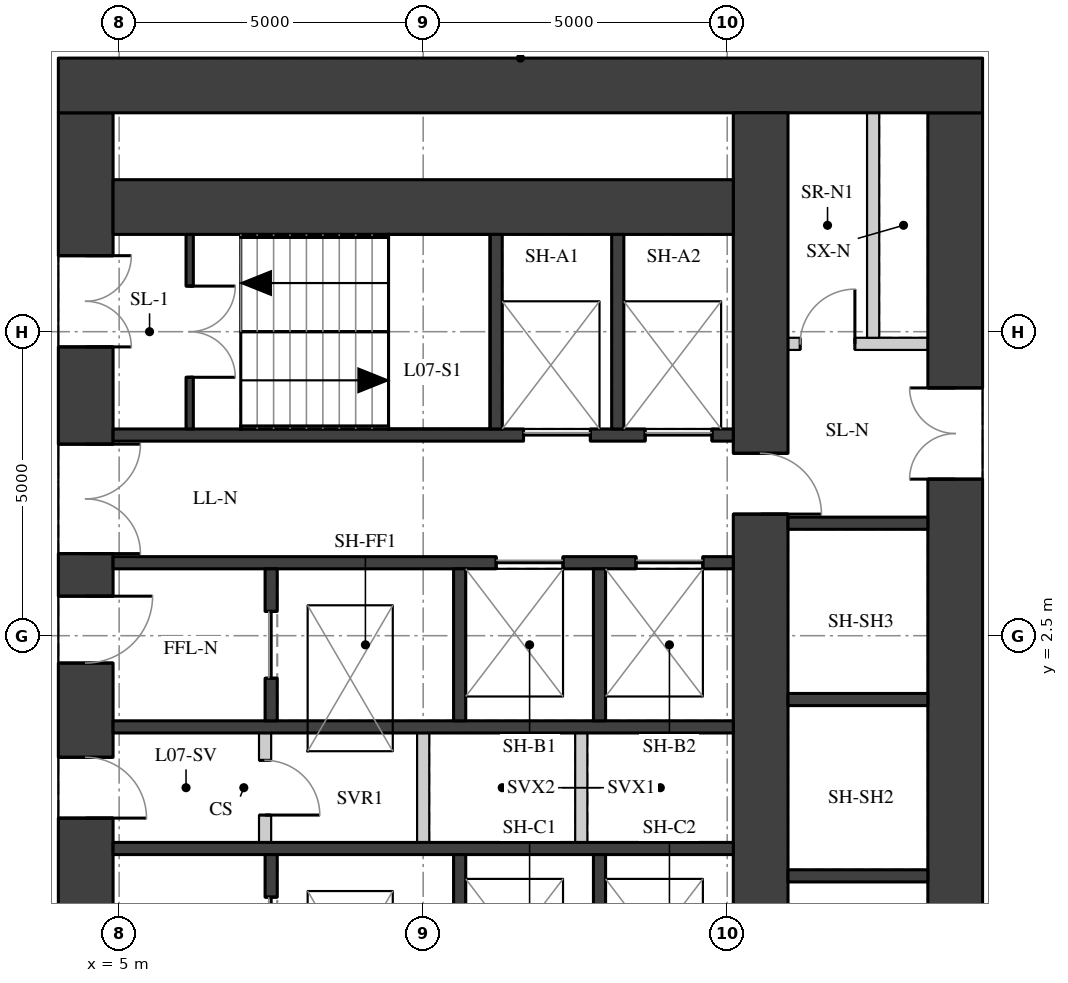
"""IFC4 building model, lengths in metres.
Left out: names, types, materials, properties, quantities, classifications, styles, units other than length and angle.
Written with IfcOpenShell. Run it as: python <this file> out.ifc"""

import sys

from ifc_helpers import new_model, si_unit, direction, frame, frame_2d, origin, place, context, subcontext, project, spatial, rectangle, extrude, element, fill, save


model = new_model("IFC4")
c1 = context("Model", 3, precision=1e-05, world=origin(), true_north=direction((0.0, 1.0)))
c2 = subcontext(c1, "Body", "Model", "MODEL_VIEW")
j1 = project(units=[si_unit("LENGTHUNIT", "METRE"), si_unit("PLANEANGLEUNIT", "RADIAN")], contexts=[c1])
p1 = place(None, origin())
s1 = spatial("IfcSite", under=j1, at=p1, CompositionType="ELEMENT")
p2 = place(p1, origin())
s2 = spatial("IfcBuilding", under=s1, at=p2, CompositionType="ELEMENT")
p3 = place(p2, frame((0.0, 0.0, 31.6)))
s3 = spatial("IfcBuildingStorey", under=s2, at=p3, CompositionType="ELEMENT", Elevation=31.6)
p4 = place(p3, frame((4.45, -11.1, 0.0), z_axis=(0.0, 0.0, 1.0), x_axis=(0.0, 1.0, 0.0)))
e1 = element("IfcWall", 1, at=p4, inside=s3, PredefinedType="SHEAR", context=c2, shape_type="SweptSolid", body=[
    extrude(rectangle(XDim=22.2, YDim=0.9, at=frame_2d((11.1, 0.0))), origin(), (0.0, 0.0, 1.0), 3.02),
])
p5 = place(p4, frame((2.35, 0.0, 0.0)))
e2 = element("IfcOpeningElement", 2, at=p5, cuts=e1, PredefinedType="OPENING", context=c2, shape_type="SweptSolid", body=[
    extrude(rectangle(XDim=1.5, YDim=2.1, at=frame_2d((0.75, 1.05))), frame((0.0, 0.46, 0.0), z_axis=(0.0, -1.0, 0.0), x_axis=(1.0, 0.0, 0.0)), (0.0, 0.0, 1.0), 0.92),
])
p6 = place(p4, frame((5.45, 0.0, 0.0)))
e3 = element("IfcOpeningElement", 3, at=p6, cuts=e1, PredefinedType="OPENING", context=c2, shape_type="SweptSolid", body=[
    extrude(rectangle(XDim=1.8, YDim=2.1, at=frame_2d((0.9, 1.05))), frame((0.0, 0.46, 0.0), z_axis=(0.0, -1.0, 0.0), x_axis=(1.0, 0.0, 0.0)), (0.0, 0.0, 1.0), 0.92),
])
p7 = place(p4, frame((7.95, 0.0, 0.0)))
e4 = element("IfcOpeningElement", 4, at=p7, cuts=e1, PredefinedType="OPENING", context=c2, shape_type="SweptSolid", body=[
    extrude(rectangle(XDim=1.1, YDim=2.1, at=frame_2d((0.55, 1.05))), frame((0.0, 0.46, 0.0), z_axis=(0.0, -1.0, 0.0), x_axis=(1.0, 0.0, 0.0)), (0.0, 0.0, 1.0), 0.92),
])
p8 = place(p4, frame((10.6, 0.0, 0.0)))
e5 = element("IfcOpeningElement", 5, at=p8, cuts=e1, PredefinedType="OPENING", context=c2, shape_type="SweptSolid", body=[
    extrude(rectangle(XDim=1.0, YDim=2.1, at=frame_2d((0.5, 1.05))), frame((0.0, 0.46, 0.0), z_axis=(0.0, -1.0, 0.0), x_axis=(1.0, 0.0, 0.0)), (0.0, 0.0, 1.0), 0.92),
])
p9 = place(p4, frame((13.15, 0.0, 0.0)))
e6 = element("IfcOpeningElement", 6, at=p9, cuts=e1, PredefinedType="OPENING", context=c2, shape_type="SweptSolid", body=[
    extrude(rectangle(XDim=1.1, YDim=2.1, at=frame_2d((0.55, 1.05))), frame((0.0, 0.46, 0.0), z_axis=(0.0, -1.0, 0.0), x_axis=(1.0, 0.0, 0.0)), (0.0, 0.0, 1.0), 0.92),
])
p10 = place(p4, frame((14.95, 0.0, 0.0)))
e7 = element("IfcOpeningElement", 7, at=p10, cuts=e1, PredefinedType="OPENING", context=c2, shape_type="SweptSolid", body=[
    extrude(rectangle(XDim=1.8, YDim=2.1, at=frame_2d((0.9, 1.05))), frame((0.0, 0.46, 0.0), z_axis=(0.0, -1.0, 0.0), x_axis=(1.0, 0.0, 0.0)), (0.0, 0.0, 1.0), 0.92),
])
p11 = place(p4, frame((18.35, 0.0, 0.0)))
e8 = element("IfcOpeningElement", 8, at=p11, cuts=e1, PredefinedType="OPENING", context=c2, shape_type="SweptSolid", body=[
    extrude(rectangle(XDim=1.5, YDim=2.1, at=frame_2d((0.75, 1.05))), frame((0.0, 0.46, 0.0), z_axis=(0.0, -1.0, 0.0), x_axis=(1.0, 0.0, 0.0)), (0.0, 0.0, 1.0), 0.92),
])
p12 = place(p3, frame((18.75, -11.1, 0.0), z_axis=(0.0, 0.0, 1.0), x_axis=(0.0, 1.0, 0.0)))
e9 = element("IfcWall", 9, at=p12, inside=s3, PredefinedType="SHEAR", context=c2, shape_type="SweptSolid", body=[
    extrude(rectangle(XDim=22.2, YDim=0.9, at=frame_2d((11.1, 0.0))), origin(), (0.0, 0.0, 1.0), 3.02),
])
p13 = place(p12, frame((16.175, 0.0, 0.0)))
e10 = element("IfcOpeningElement", 10, at=p13, cuts=e9, PredefinedType="OPENING", context=c2, shape_type="SweptSolid", body=[
    extrude(rectangle(XDim=1.5, YDim=2.1, at=frame_2d((0.75, 1.05))), frame((0.0, 0.46, 0.0), z_axis=(0.0, -1.0, 0.0), x_axis=(1.0, 0.0, 0.0)), (0.0, 0.0, 1.0), 0.92),
])
p14 = place(p12, frame((5.025, 0.0, 0.0)))
e11 = element("IfcOpeningElement", 11, at=p14, cuts=e9, PredefinedType="OPENING", context=c2, shape_type="SweptSolid", body=[
    extrude(rectangle(XDim=1.5, YDim=2.1, at=frame_2d((0.75, 1.05))), frame((0.0, 0.46, 0.0), z_axis=(0.0, -1.0, 0.0), x_axis=(1.0, 0.0, 0.0)), (0.0, 0.0, 1.0), 0.92),
])
p15 = place(p3, frame((4.0, 11.55, 0.0), z_axis=(0.0, 0.0, 1.0), x_axis=(1.0, 0.0, 0.0)))
e12 = element("IfcWall", 12, at=p15, inside=s3, PredefinedType="SHEAR", context=c2, shape_type="SweptSolid", body=[
    extrude(rectangle(XDim=15.2, YDim=0.9, at=frame_2d((7.6, 0.0))), origin(), (0.0, 0.0, 1.0), 3.02),
])
p16 = place(p3, frame((15.55, -11.1, 0.0), z_axis=(0.0, 0.0, 1.0), x_axis=(0.0, 1.0, 0.0)))
e13 = element("IfcWall", 13, at=p16, inside=s3, PredefinedType="SHEAR", context=c2, shape_type="SweptSolid", body=[
    extrude(rectangle(XDim=22.2, YDim=0.9, at=frame_2d((11.1, 0.0))), origin(), (0.0, 0.0, 1.0), 3.02),
])
p17 = place(p16, frame((15.6, 0.0, 0.0)))
e14 = element("IfcOpeningElement", 14, at=p17, cuts=e13, PredefinedType="OPENING", context=c2, shape_type="SweptSolid", body=[
    extrude(rectangle(XDim=1.0, YDim=2.1, at=frame_2d((0.5, 1.05))), frame((0.0, 0.46, 0.0), z_axis=(0.0, -1.0, 0.0), x_axis=(1.0, 0.0, 0.0)), (0.0, 0.0, 1.0), 0.92),
])
p18 = place(p16, frame((5.6, 0.0, 0.0)))
e15 = element("IfcOpeningElement", 15, at=p18, cuts=e13, PredefinedType="OPENING", context=c2, shape_type="SweptSolid", body=[
    extrude(rectangle(XDim=1.0, YDim=2.1, at=frame_2d((0.5, 1.05))), frame((0.0, 0.46, 0.0), z_axis=(0.0, -1.0, 0.0), x_axis=(1.0, 0.0, 0.0)), (0.0, 0.0, 1.0), 0.92),
])
p19 = place(p3, frame((4.9, 9.55, 0.0), z_axis=(0.0, 0.0, 1.0), x_axis=(1.0, 0.0, 0.0)))
e16 = element("IfcWall", 16, at=p19, inside=s3, PredefinedType="SHEAR", context=c2, shape_type="SweptSolid", body=[
    extrude(rectangle(XDim=10.2, YDim=0.9, at=frame_2d((5.1, 0.0))), origin(), (0.0, 0.0, 1.0), 3.02),
])
p20 = place(p3, frame((4.9, 5.8, 0.0), z_axis=(0.0, 0.0, 1.0), x_axis=(1.0, 0.0, 0.0)))
e17 = element("IfcWall", 17, at=p20, inside=s3, PredefinedType="SHEAR", context=c2, shape_type="SweptSolid", body=[
    extrude(rectangle(XDim=10.2, YDim=0.2, at=frame_2d((5.1, 0.0))), origin(), (0.0, 0.0, 1.0), 3.02),
])
p21 = place(p20, frame((6.75, 0.0, 0.0)))
e18 = element("IfcOpeningElement", 18, at=p21, cuts=e17, PredefinedType="OPENING", context=c2, shape_type="SweptSolid", body=[
    extrude(rectangle(XDim=1.1, YDim=2.1, at=frame_2d((0.55, 1.05))), frame((0.0, 0.11, 0.0), z_axis=(0.0, -1.0, 0.0), x_axis=(1.0, 0.0, 0.0)), (0.0, 0.0, 1.0), 0.22),
])
p22 = place(p20, frame((8.75, 0.0, 0.0)))
e19 = element("IfcOpeningElement", 19, at=p22, cuts=e17, PredefinedType="OPENING", context=c2, shape_type="SweptSolid", body=[
    extrude(rectangle(XDim=1.1, YDim=2.1, at=frame_2d((0.55, 1.05))), frame((0.0, 0.11, 0.0), z_axis=(0.0, -1.0, 0.0), x_axis=(1.0, 0.0, 0.0)), (0.0, 0.0, 1.0), 0.22),
])
p23 = place(p3, frame((4.9, 3.7, 0.0), z_axis=(0.0, 0.0, 1.0), x_axis=(1.0, 0.0, 0.0)))
e20 = element("IfcWall", 20, at=p23, inside=s3, PredefinedType="SHEAR", context=c2, shape_type="SweptSolid", body=[
    extrude(rectangle(XDim=10.2, YDim=0.2, at=frame_2d((5.1, 0.0))), origin(), (0.0, 0.0, 1.0), 3.02),
])
p24 = place(p23, frame((6.3, 0.0, 0.0)))
e21 = element("IfcOpeningElement", 21, at=p24, cuts=e20, PredefinedType="OPENING", context=c2, shape_type="SweptSolid", body=[
    extrude(rectangle(XDim=1.1, YDim=2.1, at=frame_2d((0.55, 1.05))), frame((0.0, 0.11, 0.0), z_axis=(0.0, -1.0, 0.0), x_axis=(1.0, 0.0, 0.0)), (0.0, 0.0, 1.0), 0.22),
])
p25 = place(p23, frame((8.6, 0.0, 0.0)))
e22 = element("IfcOpeningElement", 22, at=p25, cuts=e20, PredefinedType="OPENING", context=c2, shape_type="SweptSolid", body=[
    extrude(rectangle(XDim=1.1, YDim=2.1, at=frame_2d((0.55, 1.05))), frame((0.0, 0.11, 0.0), z_axis=(0.0, -1.0, 0.0), x_axis=(1.0, 0.0, 0.0)), (0.0, 0.0, 1.0), 0.22),
])
for number, where, z_axis, x_axis in (
    (23, (4.9, 1.0, 0.0), (0.0, 0.0, 1.0), (1.0, 0.0, 0.0)),
    (24, (4.9, -1.0, 0.0), (0.0, 0.0, 1.0), (1.0, 0.0, 0.0)),
):
    element("IfcWall", number, at=place(p3, frame(where, z_axis=z_axis, x_axis=x_axis)), inside=s3, PredefinedType="SHEAR", context=c2, shape_type="SweptSolid", body=[
        extrude(rectangle(XDim=10.2, YDim=0.2, at=frame_2d((5.1, 0.0))), origin(), (0.0, 0.0, 1.0), 3.02),
    ])
for number, where, z_axis, x_axis in (
    (25, (11.2, 5.9, 0.0), (0.0, 0.0, 1.0), (0.0, 1.0, 0.0)),
    (26, (13.2, 5.9, 0.0), (0.0, 0.0, 1.0), (0.0, 1.0, 0.0)),
):
    element("IfcWall", number, at=place(p3, frame(where, z_axis=z_axis, x_axis=x_axis)), inside=s3, PredefinedType="SHEAR", context=c2, shape_type="SweptSolid", body=[
        extrude(rectangle(XDim=3.2, YDim=0.2, at=frame_2d((1.6, 0.0))), origin(), (0.0, 0.0, 1.0), 3.02),
    ])
p26 = place(p3, frame((7.5, 1.1, 0.0), z_axis=(0.0, 0.0, 1.0), x_axis=(0.0, 1.0, 0.0)))
e27 = element("IfcWall", 27, at=p26, inside=s3, PredefinedType="SHEAR", context=c2, shape_type="SweptSolid", body=[
    extrude(rectangle(XDim=2.5, YDim=0.2, at=frame_2d((1.25, 0.0))), origin(), (0.0, 0.0, 1.0), 3.02),
])
p27 = place(p26, frame((0.7, 0.0, 0.0)))
e28 = element("IfcOpeningElement", 28, at=p27, cuts=e27, PredefinedType="OPENING", context=c2, shape_type="SweptSolid", body=[
    extrude(rectangle(XDim=1.1, YDim=2.1, at=frame_2d((0.55, 1.05))), frame((0.0, 0.11, 0.0), z_axis=(0.0, -1.0, 0.0), x_axis=(1.0, 0.0, 0.0)), (0.0, 0.0, 1.0), 0.22),
])
p28 = place(p3, frame((7.5, -3.6, 0.0), z_axis=(0.0, 0.0, 1.0), x_axis=(0.0, 1.0, 0.0)))
e29 = element("IfcWall", 29, at=p28, inside=s3, PredefinedType="SHEAR", context=c2, shape_type="SweptSolid", body=[
    extrude(rectangle(XDim=2.5, YDim=0.2, at=frame_2d((1.25, 0.0))), origin(), (0.0, 0.0, 1.0), 3.02),
])
p29 = place(p28, frame((0.7, 0.0, 0.0)))
e30 = element("IfcOpeningElement", 30, at=p29, cuts=e29, PredefinedType="OPENING", context=c2, shape_type="SweptSolid", body=[
    extrude(rectangle(XDim=1.1, YDim=2.1, at=frame_2d((0.55, 1.05))), frame((0.0, 0.11, 0.0), z_axis=(0.0, -1.0, 0.0), x_axis=(1.0, 0.0, 0.0)), (0.0, 0.0, 1.0), 0.22),
])
for number, where, z_axis, x_axis in (
    (31, (10.6, 1.1, 0.0), (0.0, 0.0, 1.0), (0.0, 1.0, 0.0)),
    (32, (10.6, -3.6, 0.0), (0.0, 0.0, 1.0), (0.0, 1.0, 0.0)),
    (33, (12.9, 1.1, 0.0), (0.0, 0.0, 1.0), (0.0, 1.0, 0.0)),
    (34, (12.9, -3.6, 0.0), (0.0, 0.0, 1.0), (0.0, 1.0, 0.0)),
):
    element("IfcWall", number, at=place(p3, frame(where, z_axis=z_axis, x_axis=x_axis)), inside=s3, PredefinedType="SHEAR", context=c2, shape_type="SweptSolid", body=[
        extrude(rectangle(XDim=2.5, YDim=0.2, at=frame_2d((1.25, 0.0))), origin(), (0.0, 0.0, 1.0), 3.02),
    ])
p30 = place(p3, frame((6.16, 5.9, 0.0), z_axis=(0.0, 0.0, 1.0), x_axis=(0.0, 1.0, 0.0)))
e35 = element("IfcWall", 35, at=p30, inside=s3, PredefinedType="SHEAR", context=c2, shape_type="SweptSolid", body=[
    extrude(rectangle(XDim=3.2, YDim=0.12, at=frame_2d((1.6, 0.0))), origin(), (0.0, 0.0, 1.0), 3.02),
])
p31 = place(p30, frame((0.85, 0.0, 0.0)))
e36 = element("IfcOpeningElement", 36, at=p31, cuts=e35, PredefinedType="OPENING", context=c2, shape_type="SweptSolid", body=[
    extrude(rectangle(XDim=1.5, YDim=2.1, at=frame_2d((0.75, 1.05))), frame((0.0, 0.07, 0.0), z_axis=(0.0, -1.0, 0.0), x_axis=(1.0, 0.0, 0.0)), (0.0, 0.0, 1.0), 0.14),
])
p32 = place(p3, frame((7.4, -0.9, 0.0), z_axis=(0.0, 0.0, 1.0), x_axis=(0.0, 1.0, 0.0)))
e37 = element("IfcWall", 37, at=p32, inside=s3, PredefinedType="PARTITIONING", context=c2, shape_type="SweptSolid", body=[
    extrude(rectangle(XDim=1.8, YDim=0.2, at=frame_2d((0.9, 0.0))), origin(), (0.0, 0.0, 1.0), 3.02),
])
p33 = place(p32, frame((0.45, 0.0, 0.0)))
e38 = element("IfcOpeningElement", 38, at=p33, cuts=e37, PredefinedType="OPENING", context=c2, shape_type="SweptSolid", body=[
    extrude(rectangle(XDim=0.9, YDim=2.1, at=frame_2d((0.45, 1.05))), frame((0.0, 0.11, 0.0), z_axis=(0.0, -1.0, 0.0), x_axis=(1.0, 0.0, 0.0)), (0.0, 0.0, 1.0), 0.22),
])
for number, where, z_axis, x_axis in (
    (39, (10.0, -0.9, 0.0), (0.0, 0.0, 1.0), (0.0, 1.0, 0.0)),
    (40, (12.6, -0.9, 0.0), (0.0, 0.0, 1.0), (0.0, 1.0, 0.0)),
):
    element("IfcWall", number, at=place(p3, frame(where, z_axis=z_axis, x_axis=x_axis)), inside=s3, PredefinedType="PARTITIONING", context=c2, shape_type="SweptSolid", body=[
        extrude(rectangle(XDim=1.8, YDim=0.2, at=frame_2d((0.9, 0.0))), origin(), (0.0, 0.0, 1.0), 3.02),
    ])
for number, where, z_axis, x_axis in (
    (41, (16.0, -1.45, 0.0), (0.0, 0.0, 1.0), (1.0, 0.0, 0.0)),
    (42, (16.0, 1.45, 0.0), (0.0, 0.0, 1.0), (1.0, 0.0, 0.0)),
    (43, (16.0, 4.35, 0.0), (0.0, 0.0, 1.0), (1.0, 0.0, 0.0)),
):
    element("IfcWall", number, at=place(p3, frame(where, z_axis=z_axis, x_axis=x_axis)), inside=s3, PredefinedType="SHEAR", context=c2, shape_type="SweptSolid", body=[
        extrude(rectangle(XDim=2.3, YDim=0.2, at=frame_2d((1.15, 0.0))), origin(), (0.0, 0.0, 1.0), 3.02),
    ])
p34 = place(p3, frame((16.0, 7.3, 0.0), z_axis=(0.0, 0.0, 1.0), x_axis=(1.0, 0.0, 0.0)))
e44 = element("IfcWall", 44, at=p34, inside=s3, PredefinedType="PARTITIONING", context=c2, shape_type="SweptSolid", body=[
    extrude(rectangle(XDim=2.3, YDim=0.2, at=frame_2d((1.15, 0.0))), origin(), (0.0, 0.0, 1.0), 3.02),
])
p35 = place(p34, frame((0.2, 0.0, 0.0)))
e45 = element("IfcOpeningElement", 45, at=p35, cuts=e44, PredefinedType="OPENING", context=c2, shape_type="SweptSolid", body=[
    extrude(rectangle(XDim=0.9, YDim=2.1, at=frame_2d((0.45, 1.05))), frame((0.0, 0.11, 0.0), z_axis=(0.0, -1.0, 0.0), x_axis=(1.0, 0.0, 0.0)), (0.0, 0.0, 1.0), 0.22),
])
p36 = place(p3, frame((17.4, 7.4, 0.0), z_axis=(0.0, 0.0, 1.0), x_axis=(0.0, 1.0, 0.0)))
e46 = element("IfcWall", 46, at=p36, inside=s3, PredefinedType="PARTITIONING", context=c2, shape_type="SweptSolid", body=[
    extrude(rectangle(XDim=3.7, YDim=0.2, at=frame_2d((1.85, 0.0))), origin(), (0.0, 0.0, 1.0), 3.02),
])
p37 = place(p8, origin())
e47 = element("IfcDoor", 47, at=p37, inside=s3, OperationType="SINGLE_SWING_RIGHT", PredefinedType="DOOR", context=c2, shape_type="SweptSolid", body=[
    extrude(rectangle(XDim=1.0, YDim=2.1, at=frame_2d((0.5, 1.05))), frame((0.0, 0.025, 0.0), z_axis=(0.0, -1.0, 0.0), x_axis=(1.0, 0.0, 0.0)), (0.0, 0.0, 1.0), 0.05),
])
fill(e5, e47)
p38 = place(p9, origin())
e48 = element("IfcDoor", 48, at=p38, inside=s3, OperationType="SINGLE_SWING_LEFT", PredefinedType="DOOR", context=c2, shape_type="SweptSolid", body=[
    extrude(rectangle(XDim=1.1, YDim=2.1, at=frame_2d((0.55, 1.05))), frame((0.0, 0.025, 0.0), z_axis=(0.0, -1.0, 0.0), x_axis=(1.0, 0.0, 0.0)), (0.0, 0.0, 1.0), 0.05),
])
fill(e6, e48)
p39 = place(p10, origin())
e49 = element("IfcDoor", 49, at=p39, inside=s3, OperationType="DOUBLE_DOOR_SINGLE_SWING", PredefinedType="DOOR", context=c2, shape_type="SweptSolid", body=[
    extrude(rectangle(XDim=1.8, YDim=2.1, at=frame_2d((0.9, 1.05))), frame((0.0, 0.025, 0.0), z_axis=(0.0, -1.0, 0.0), x_axis=(1.0, 0.0, 0.0)), (0.0, 0.0, 1.0), 0.05),
])
fill(e7, e49)
p40 = place(p11, origin())
e50 = element("IfcDoor", 50, at=p40, inside=s3, OperationType="DOUBLE_DOOR_SINGLE_SWING", PredefinedType="DOOR", context=c2, shape_type="SweptSolid", body=[
    extrude(rectangle(XDim=1.5, YDim=2.1, at=frame_2d((0.75, 1.05))), frame((0.0, 0.025, 0.0), z_axis=(0.0, -1.0, 0.0), x_axis=(1.0, 0.0, 0.0)), (0.0, 0.0, 1.0), 0.05),
])
fill(e8, e50)
p41 = place(p13, origin())
e51 = element("IfcDoor", 51, at=p41, inside=s3, OperationType="DOUBLE_DOOR_SINGLE_SWING", PredefinedType="DOOR", context=c2, shape_type="SweptSolid", body=[
    extrude(rectangle(XDim=1.5, YDim=2.1, at=frame_2d((0.75, 1.05))), frame((0.0, 0.025, 0.0), z_axis=(0.0, -1.0, 0.0), x_axis=(1.0, 0.0, 0.0)), (0.0, 0.0, 1.0), 0.05),
])
fill(e10, e51)
p42 = place(p31, origin())
e52 = element("IfcDoor", 52, at=p42, inside=s3, OperationType="DOUBLE_DOOR_SINGLE_SWING", PredefinedType="DOOR", context=c2, shape_type="SweptSolid", body=[
    extrude(rectangle(XDim=1.5, YDim=2.1, at=frame_2d((0.75, 1.05))), frame((0.0, 0.025, 0.0), z_axis=(0.0, -1.0, 0.0), x_axis=(1.0, 0.0, 0.0)), (0.0, 0.0, 1.0), 0.05),
])
fill(e36, e52)
p43 = place(p21, origin())
e53 = element("IfcDoor", 53, at=p43, inside=s3, OperationType="DOUBLE_DOOR_SLIDING", PredefinedType="DOOR", context=c2, shape_type="SweptSolid", body=[
    extrude(rectangle(XDim=1.1, YDim=2.1, at=frame_2d((0.55, 1.05))), frame((0.0, 0.025, 0.0), z_axis=(0.0, -1.0, 0.0), x_axis=(1.0, 0.0, 0.0)), (0.0, 0.0, 1.0), 0.05),
])
fill(e18, e53)
p44 = place(p22, origin())
e54 = element("IfcDoor", 54, at=p44, inside=s3, OperationType="DOUBLE_DOOR_SLIDING", PredefinedType="DOOR", context=c2, shape_type="SweptSolid", body=[
    extrude(rectangle(XDim=1.1, YDim=2.1, at=frame_2d((0.55, 1.05))), frame((0.0, 0.025, 0.0), z_axis=(0.0, -1.0, 0.0), x_axis=(1.0, 0.0, 0.0)), (0.0, 0.0, 1.0), 0.05),
])
fill(e19, e54)
p45 = place(p24, origin())
e55 = element("IfcDoor", 55, at=p45, inside=s3, OperationType="DOUBLE_DOOR_SLIDING", PredefinedType="DOOR", context=c2, shape_type="SweptSolid", body=[
    extrude(rectangle(XDim=1.1, YDim=2.1, at=frame_2d((0.55, 1.05))), frame((0.0, 0.025, 0.0), z_axis=(0.0, -1.0, 0.0), x_axis=(1.0, 0.0, 0.0)), (0.0, 0.0, 1.0), 0.05),
])
fill(e21, e55)
p46 = place(p25, origin())
e56 = element("IfcDoor", 56, at=p46, inside=s3, OperationType="DOUBLE_DOOR_SLIDING", PredefinedType="DOOR", context=c2, shape_type="SweptSolid", body=[
    extrude(rectangle(XDim=1.1, YDim=2.1, at=frame_2d((0.55, 1.05))), frame((0.0, 0.025, 0.0), z_axis=(0.0, -1.0, 0.0), x_axis=(1.0, 0.0, 0.0)), (0.0, 0.0, 1.0), 0.05),
])
fill(e22, e56)
p47 = place(p27, origin())
e57 = element("IfcDoor", 57, at=p47, inside=s3, OperationType="DOUBLE_DOOR_SLIDING", PredefinedType="DOOR", context=c2, shape_type="SweptSolid", body=[
    extrude(rectangle(XDim=1.1, YDim=2.1, at=frame_2d((0.55, 1.05))), frame((0.0, 0.025, 0.0), z_axis=(0.0, -1.0, 0.0), x_axis=(1.0, 0.0, 0.0)), (0.0, 0.0, 1.0), 0.05),
])
fill(e28, e57)
p48 = place(p29, origin())
e58 = element("IfcDoor", 58, at=p48, inside=s3, OperationType="DOUBLE_DOOR_SLIDING", PredefinedType="DOOR", context=c2, shape_type="SweptSolid", body=[
    extrude(rectangle(XDim=1.1, YDim=2.1, at=frame_2d((0.55, 1.05))), frame((0.0, 0.025, 0.0), z_axis=(0.0, -1.0, 0.0), x_axis=(1.0, 0.0, 0.0)), (0.0, 0.0, 1.0), 0.05),
])
fill(e30, e58)
p49 = place(p33, origin())
e59 = element("IfcDoor", 59, at=p49, inside=s3, OperationType="SINGLE_SWING_RIGHT", PredefinedType="DOOR", context=c2, shape_type="SweptSolid", body=[
    extrude(rectangle(XDim=0.9, YDim=2.1, at=frame_2d((0.45, 1.05))), frame((0.0, 0.025, 0.0), z_axis=(0.0, -1.0, 0.0), x_axis=(1.0, 0.0, 0.0)), (0.0, 0.0, 1.0), 0.05),
])
fill(e38, e59)
p50 = place(p17, origin())
e60 = element("IfcDoor", 60, at=p50, inside=s3, OperationType="SINGLE_SWING_RIGHT", PredefinedType="DOOR", context=c2, shape_type="SweptSolid", body=[
    extrude(rectangle(XDim=1.0, YDim=2.1, at=frame_2d((0.5, 1.05))), frame((0.0, 0.025, 0.0), z_axis=(0.0, -1.0, 0.0), x_axis=(1.0, 0.0, 0.0)), (0.0, 0.0, 1.0), 0.05),
])
fill(e14, e60)
p51 = place(p35, origin())
e61 = element("IfcDoor", 61, at=p51, inside=s3, OperationType="SINGLE_SWING_RIGHT", PredefinedType="DOOR", context=c2, shape_type="SweptSolid", body=[
    extrude(rectangle(XDim=0.9, YDim=2.1, at=frame_2d((0.45, 1.05))), frame((0.0, 0.025, 0.0), z_axis=(0.0, -1.0, 0.0), x_axis=(1.0, 0.0, 0.0)), (0.0, 0.0, 1.0), 0.05),
])
fill(e45, e61)
save(model, sys.argv[1])
